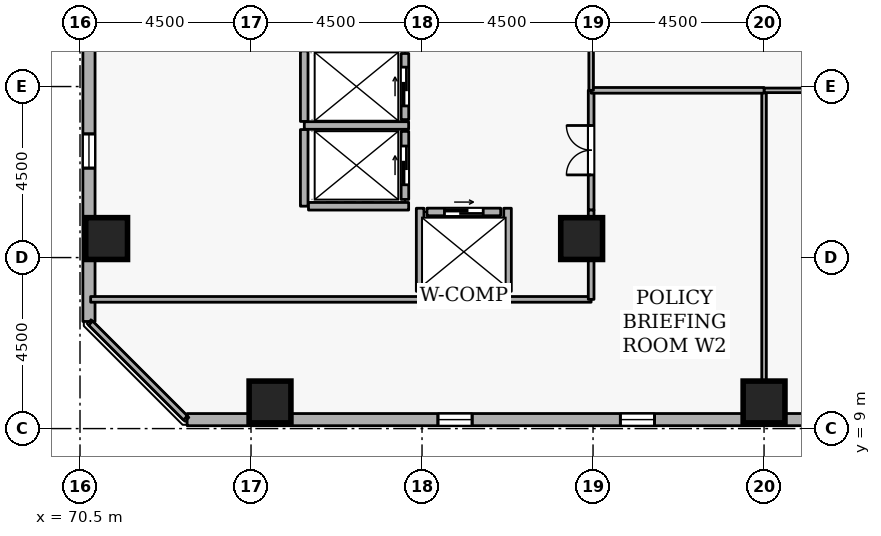
"""IFC4 building model, lengths in metres.
Left out: names, types, materials, properties, quantities, classifications, styles, units other than length and angle.
Written with IfcOpenShell. Run it as: python <this file> out.ifc"""

import sys

from ifc_helpers import new_model, si_unit, direction, frame, frame_2d, origin, origin_2d, place, context, subcontext, project, spatial, rectangle, extrude, element, fill, save


model = new_model("IFC4")
c1 = context("Model", 3, precision=1e-05, world=origin(), true_north=direction((0.0, 1.0)))
c2 = subcontext(c1, "Body", "Model", "MODEL_VIEW")
j1 = project(units=[si_unit("LENGTHUNIT", "METRE"), si_unit("PLANEANGLEUNIT", "RADIAN")], contexts=[c1])
p1 = place(None, origin())
s1 = spatial("IfcSite", under=j1, at=p1, CompositionType="ELEMENT")
p2 = place(p1, origin())
s2 = spatial("IfcBuilding", under=s1, at=p2, CompositionType="ELEMENT")
p3 = place(p2, frame((0.0, 0.0, 159.9)))
s3 = spatial("IfcBuildingStorey", under=s2, at=p3, CompositionType="ELEMENT", Elevation=159.9)
for number, where, z_axis, x_axis in (
    (1, (71.2, 14.0, 0.0), (0.0, 0.0, 1.0), (1.0, 0.0, 0.0)),
    (2, (88.5, 9.7, 0.0), (0.0, 0.0, 1.0), (1.0, 0.0, 0.0)),
    (3, (75.5, 9.7, 0.0), (0.0, 0.0, 1.0), (1.0, 0.0, 0.0)),
    (4, (83.7, 14.0, 0.0), (0.0, 0.0, 1.0), (1.0, 0.0, 0.0)),
):
    element("IfcColumn", number, at=place(p3, frame(where, z_axis=z_axis, x_axis=x_axis)), inside=s3, PredefinedType="COLUMN", context=c2, shape_type="SweptSolid", body=[
        extrude(rectangle(XDim=1.1, YDim=1.1, at=origin_2d()), origin(), (0.0, 0.0, 1.0), 3.6),
    ])
p4 = place(p3, frame((73.319, 9.235, 0.0), z_axis=(0.0, 0.0, 1.0), x_axis=(0.999999997144, 7.5574884e-05, 0.0)))
e5 = element("IfcWall", 5, at=p4, inside=s3, PredefinedType="STANDARD", context=c2, shape_type="SweptSolid", body=[
    extrude(rectangle(XDim=35.535, YDim=0.32, at=frame_2d((17.768, 0.0))), origin(), (0.0, 0.0, 1.0), 2.7),
])
p5 = place(p4, frame((6.6, 0.0, 0.72)))
e6 = element("IfcOpeningElement", 6, at=p5, cuts=e5, PredefinedType="OPENING", context=c2, shape_type="SweptSolid", body=[
    extrude(rectangle(XDim=0.9, YDim=1.75, at=frame_2d((0.45, 0.875))), frame((0.0, 0.17, 0.0), z_axis=(0.0, -1.0, 0.0), x_axis=(1.0, 0.0, 0.0)), (0.0, 0.0, 1.0), 0.34),
])
p6 = place(p4, frame((11.4, 0.0, 0.72)))
e7 = element("IfcOpeningElement", 7, at=p6, cuts=e5, PredefinedType="OPENING", context=c2, shape_type="SweptSolid", body=[
    extrude(rectangle(XDim=0.9, YDim=1.75, at=frame_2d((0.45, 0.875))), frame((0.0, 0.17, 0.0), z_axis=(0.0, -1.0, 0.0), x_axis=(1.0, 0.0, 0.0)), (0.0, 0.0, 1.0), 0.34),
])
p7 = place(p4, frame((21.0, 0.0, 0.72)))
e8 = element("IfcOpeningElement", 8, at=p7, cuts=e5, PredefinedType="OPENING", context=c2, shape_type="SweptSolid", body=[
    extrude(rectangle(XDim=0.9, YDim=1.75, at=frame_2d((0.45, 0.875))), frame((0.0, 0.17, 0.0), z_axis=(0.0, -1.0, 0.0), x_axis=(1.0, 0.0, 0.0)), (0.0, 0.0, 1.0), 0.34),
])
p8 = place(p4, frame((25.8, 0.0, 0.72)))
e9 = element("IfcOpeningElement", 9, at=p8, cuts=e5, PredefinedType="OPENING", context=c2, shape_type="SweptSolid", body=[
    extrude(rectangle(XDim=0.9, YDim=1.75, at=frame_2d((0.45, 0.875))), frame((0.0, 0.17, 0.0), z_axis=(0.0, -1.0, 0.0), x_axis=(1.0, 0.0, 0.0)), (0.0, 0.0, 1.0), 0.34),
])
p9 = place(p4, frame((30.6, 0.0, 0.72)))
e10 = element("IfcOpeningElement", 10, at=p9, cuts=e5, PredefinedType="OPENING", context=c2, shape_type="SweptSolid", body=[
    extrude(rectangle(XDim=0.9, YDim=1.75, at=frame_2d((0.45, 0.875))), frame((0.0, 0.17, 0.0), z_axis=(0.0, -1.0, 0.0), x_axis=(1.0, 0.0, 0.0)), (0.0, 0.0, 1.0), 0.34),
])
p10 = place(p3, frame((70.738, 47.354, 0.0), z_axis=(0.0, 0.0, 1.0), x_axis=(-7.5574884e-05, -0.999999997144, 0.0)))
e11 = element("IfcWall", 11, at=p10, inside=s3, PredefinedType="STANDARD", context=c2, shape_type="SweptSolid", body=[
    extrude(rectangle(XDim=35.535, YDim=0.32, at=frame_2d((17.768, 0.0))), origin(), (0.0, 0.0, 1.0), 2.7),
])
p11 = place(p10, frame((1.8, 0.0, 0.72)))
e12 = element("IfcOpeningElement", 12, at=p11, cuts=e11, PredefinedType="OPENING", context=c2, shape_type="SweptSolid", body=[
    extrude(rectangle(XDim=0.9, YDim=1.75, at=frame_2d((0.45, 0.875))), frame((0.0, 0.17, 0.0), z_axis=(0.0, -1.0, 0.0), x_axis=(1.0, 0.0, 0.0)), (0.0, 0.0, 1.0), 0.34),
])
p12 = place(p10, frame((11.4, 0.0, 0.72)))
e13 = element("IfcOpeningElement", 13, at=p12, cuts=e11, PredefinedType="OPENING", context=c2, shape_type="SweptSolid", body=[
    extrude(rectangle(XDim=0.9, YDim=1.75, at=frame_2d((0.45, 0.875))), frame((0.0, 0.17, 0.0), z_axis=(0.0, -1.0, 0.0), x_axis=(1.0, 0.0, 0.0)), (0.0, 0.0, 1.0), 0.34),
])
p13 = place(p10, frame((16.2, 0.0, 0.72)))
e14 = element("IfcOpeningElement", 14, at=p13, cuts=e11, PredefinedType="OPENING", context=c2, shape_type="SweptSolid", body=[
    extrude(rectangle(XDim=0.9, YDim=1.75, at=frame_2d((0.45, 0.875))), frame((0.0, 0.17, 0.0), z_axis=(0.0, -1.0, 0.0), x_axis=(1.0, 0.0, 0.0)), (0.0, 0.0, 1.0), 0.34),
])
p14 = place(p10, frame((25.8, 0.0, 0.72)))
e15 = element("IfcOpeningElement", 15, at=p14, cuts=e11, PredefinedType="OPENING", context=c2, shape_type="SweptSolid", body=[
    extrude(rectangle(XDim=0.9, YDim=1.75, at=frame_2d((0.45, 0.875))), frame((0.0, 0.17, 0.0), z_axis=(0.0, -1.0, 0.0), x_axis=(1.0, 0.0, 0.0)), (0.0, 0.0, 1.0), 0.34),
])
p15 = place(p10, frame((30.6, 0.0, 0.72)))
e16 = element("IfcOpeningElement", 16, at=p15, cuts=e11, PredefinedType="OPENING", context=c2, shape_type="SweptSolid", body=[
    extrude(rectangle(XDim=0.9, YDim=1.75, at=frame_2d((0.45, 0.875))), frame((0.0, 0.17, 0.0), z_axis=(0.0, -1.0, 0.0), x_axis=(1.0, 0.0, 0.0)), (0.0, 0.0, 1.0), 0.34),
])
p16 = place(p3, frame((79.05, 17.13, 0.0), z_axis=(0.0, 0.0, 1.0), x_axis=(0.0, 1.0, 0.0)))
e17 = element("IfcWall", 17, at=p16, inside=s3, PredefinedType="STANDARD", context=c2, shape_type="SweptSolid", body=[
    extrude(rectangle(XDim=1.74, YDim=0.2, at=frame_2d((0.87, 0.0))), origin(), (0.0, 0.0, 1.0), 3.34),
])
p17 = place(p16, frame((0.36, 0.0, 0.0)))
e18 = element("IfcOpeningElement", 18, at=p17, cuts=e17, PredefinedType="OPENING", context=c2, shape_type="SweptSolid", body=[
    extrude(rectangle(XDim=1.02, YDim=2.06, at=frame_2d((0.51, 1.03))), frame((0.0, 0.11, 0.0), z_axis=(0.0, -1.0, 0.0), x_axis=(1.0, 0.0, 0.0)), (0.0, 0.0, 1.0), 0.22),
])
p18 = place(p3, frame((79.05, 15.03, 0.0), z_axis=(0.0, 0.0, 1.0), x_axis=(0.0, 1.0, 0.0)))
e19 = element("IfcWall", 19, at=p18, inside=s3, PredefinedType="STANDARD", context=c2, shape_type="SweptSolid", body=[
    extrude(rectangle(XDim=1.79, YDim=0.2, at=frame_2d((0.895, 0.0))), origin(), (0.0, 0.0, 1.0), 3.34),
])
p19 = place(p18, frame((0.385, 0.0, 0.0)))
e20 = element("IfcOpeningElement", 20, at=p19, cuts=e19, PredefinedType="OPENING", context=c2, shape_type="SweptSolid", body=[
    extrude(rectangle(XDim=1.02, YDim=2.06, at=frame_2d((0.51, 1.03))), frame((0.0, 0.11, 0.0), z_axis=(0.0, -1.0, 0.0), x_axis=(1.0, 0.0, 0.0)), (0.0, 0.0, 1.0), 0.22),
])
p20 = place(p3, frame((79.63, 14.7, 0.0), z_axis=(0.0, 0.0, 1.0), x_axis=(1.0, 0.0, 0.0)))
e21 = element("IfcWall", 21, at=p20, inside=s3, PredefinedType="STANDARD", context=c2, shape_type="SweptSolid", body=[
    extrude(rectangle(XDim=1.94, YDim=0.2, at=frame_2d((0.97, 0.0))), origin(), (0.0, 0.0, 1.0), 3.34),
])
p21 = place(p20, frame((0.46, 0.0, 0.0)))
e22 = element("IfcOpeningElement", 22, at=p21, cuts=e21, PredefinedType="OPENING", context=c2, shape_type="SweptSolid", body=[
    extrude(rectangle(XDim=1.02, YDim=2.06, at=frame_2d((0.51, 1.03))), frame((0.0, 0.11, 0.0), z_axis=(0.0, -1.0, 0.0), x_axis=(1.0, 0.0, 0.0)), (0.0, 0.0, 1.0), 0.22),
])
p22 = place(p3, frame((76.402, 16.975, 0.0), z_axis=(0.0, 0.0, 1.0), x_axis=(1.0, 0.0, 0.0)))
e23 = element("IfcWall", 23, at=p22, inside=s3, PredefinedType="STANDARD", context=c2, shape_type="SweptSolid", body=[
    extrude(rectangle(XDim=2.746, YDim=0.2, at=frame_2d((1.373, 0.0))), origin(), (0.0, 0.0, 1.0), 3.34),
])
p23 = place(p3, frame((76.4, 14.852, 0.0), z_axis=(0.0, 0.0, 1.0), x_axis=(0.0, 1.0, 0.0)))
e24 = element("IfcWall", 24, at=p23, inside=s3, PredefinedType="STANDARD", context=c2, shape_type="SweptSolid", body=[
    extrude(rectangle(XDim=2.016, YDim=0.2, at=frame_2d((1.008, 0.0))), origin(), (0.0, 0.0, 1.0), 3.34),
])
p24 = place(p3, frame((76.4, 17.082, 0.0), z_axis=(0.0, 0.0, 1.0), x_axis=(0.0, 1.0, 0.0)))
e25 = element("IfcWall", 25, at=p24, inside=s3, PredefinedType="STANDARD", context=c2, shape_type="SweptSolid", body=[
    extrude(rectangle(XDim=1.856, YDim=0.2, at=frame_2d((0.928, 0.0))), origin(), (0.0, 0.0, 1.0), 3.34),
])
p25 = place(p3, frame((76.512, 14.85, 0.0), z_axis=(0.0, 0.0, 1.0), x_axis=(1.0, 0.0, 0.0)))
e26 = element("IfcWall", 26, at=p25, inside=s3, PredefinedType="STANDARD", context=c2, shape_type="SweptSolid", body=[
    extrude(rectangle(XDim=2.636, YDim=0.2, at=frame_2d((1.318, 0.0))), origin(), (0.0, 0.0, 1.0), 3.34),
])
p26 = place(p3, frame((79.452, 12.5, 0.0), z_axis=(0.0, 0.0, 1.0), x_axis=(1.0, 0.0, 0.0)))
e27 = element("IfcWall", 27, at=p26, inside=s3, PredefinedType="STANDARD", context=c2, shape_type="SweptSolid", body=[
    extrude(rectangle(XDim=2.296, YDim=0.2, at=frame_2d((1.148, 0.0))), origin(), (0.0, 0.0, 1.0), 3.34),
])
for number, where, z_axis, x_axis in (
    (28, (81.75, 12.612, 0.0), (0.0, 0.0, 1.0), (0.0, 1.0, 0.0)),
    (29, (79.45, 12.612, 0.0), (0.0, 0.0, 1.0), (0.0, 1.0, 0.0)),
):
    element("IfcWall", number, at=place(p3, frame(where, z_axis=z_axis, x_axis=x_axis)), inside=s3, PredefinedType="STANDARD", context=c2, shape_type="SweptSolid", body=[
        extrude(rectangle(XDim=2.186, YDim=0.2, at=frame_2d((1.093, 0.0))), origin(), (0.0, 0.0, 1.0), 3.34),
    ])
p27 = place(p3, frame((88.5, 9.28, 0.0), z_axis=(0.0, 0.0, 1.0), x_axis=(0.0, 1.0, 0.0)))
e30 = element("IfcWall", 30, at=p27, inside=s3, PredefinedType="PARTITIONING", context=c2, shape_type="SweptSolid", body=[
    extrude(rectangle(XDim=8.62, YDim=0.12, at=frame_2d((4.31, 0.0))), origin(), (0.0, 0.0, 1.0), 2.878),
])
p28 = place(p3, frame((88.5, 17.9, 0.0), z_axis=(0.0, 0.0, 1.0), x_axis=(1.0, 0.0, 0.0)))
e31 = element("IfcWall", 31, at=p28, inside=s3, PredefinedType="PARTITIONING", context=c2, shape_type="SweptSolid", body=[
    extrude(rectangle(XDim=4.55, YDim=0.12, at=frame_2d((2.275, 0.0))), origin(), (0.0, 0.0, 1.0), 3.34),
])
p29 = place(p3, frame((83.95, 14.75, 0.0), z_axis=(0.0, 0.0, 1.0), x_axis=(0.0, 1.0, 0.0)))
e32 = element("IfcWall", 32, at=p29, inside=s3, PredefinedType="PARTITIONING", context=c2, shape_type="SweptSolid", body=[
    extrude(rectangle(XDim=3.15, YDim=0.15, at=frame_2d((1.575, 0.0))), origin(), (0.0, 0.0, 1.0), 3.34),
])
p30 = place(p29, frame((0.925, 0.0, 0.0)))
e33 = element("IfcOpeningElement", 33, at=p30, cuts=e32, PredefinedType="OPENING", context=c2, shape_type="SweptSolid", body=[
    extrude(rectangle(XDim=1.3, YDim=2.12, at=frame_2d((0.65, 1.06))), frame((0.0, 0.085, 0.0), z_axis=(0.0, -1.0, 0.0), x_axis=(1.0, 0.0, 0.0)), (0.0, 0.0, 1.0), 0.17),
])
p31 = place(p3, frame((83.95, 17.9, 0.0), z_axis=(0.0, 0.0, 1.0), x_axis=(1.0, 0.0, 0.0)))
e34 = element("IfcWall", 34, at=p31, inside=s3, PredefinedType="PARTITIONING", context=c2, shape_type="SweptSolid", body=[
    extrude(rectangle(XDim=4.55, YDim=0.15, at=frame_2d((2.275, 0.0))), origin(), (0.0, 0.0, 1.0), 3.34),
])
p32 = place(p3, frame((73.275, 9.28, 0.0), z_axis=(0.0, 0.0, 1.0), x_axis=(-0.707106781187, 0.707106781187, 0.0)))
e35 = element("IfcWall", 35, at=p32, inside=s3, PredefinedType="PARTITIONING", context=c2, shape_type="SweptSolid", body=[
    extrude(rectangle(XDim=3.528, YDim=0.15, at=frame_2d((1.764, 0.0))), origin(), (0.0, 0.0, 1.0), 3.34),
])
p33 = place(p3, frame((70.78, 12.4, 0.0), z_axis=(0.0, 0.0, 1.0), x_axis=(1.0, 0.0, 0.0)))
e36 = element("IfcWall", 36, at=p33, inside=s3, PredefinedType="PARTITIONING", context=c2, shape_type="SweptSolid", body=[
    extrude(rectangle(XDim=8.672, YDim=0.15, at=frame_2d((4.336, 0.0))), origin(), (0.0, 0.0, 1.0), 3.34),
])
p34 = place(p3, frame((81.748, 12.4, 0.0), z_axis=(0.0, 0.0, 1.0), x_axis=(1.0, 0.0, 0.0)))
e37 = element("IfcWall", 37, at=p34, inside=s3, PredefinedType="PARTITIONING", context=c2, shape_type="SweptSolid", body=[
    extrude(rectangle(XDim=2.202, YDim=0.15, at=frame_2d((1.101, 0.0))), origin(), (0.0, 0.0, 1.0), 3.34),
])
p35 = place(p3, frame((83.95, 12.4, 0.0), z_axis=(0.0, 0.0, 1.0), x_axis=(0.0, 1.0, 0.0)))
e38 = element("IfcWall", 38, at=p35, inside=s3, PredefinedType="PARTITIONING", context=c2, shape_type="SweptSolid", body=[
    extrude(rectangle(XDim=2.35, YDim=0.15, at=frame_2d((1.175, 0.0))), origin(), (0.0, 0.0, 1.0), 3.34),
])
p36 = place(p3, frame((83.95, 17.9, 0.0), z_axis=(0.0, 0.0, 1.0), x_axis=(0.0, 1.0, 0.0)))
e39 = element("IfcWall", 39, at=p36, inside=s3, PredefinedType="PARTITIONING", context=c2, shape_type="SweptSolid", body=[
    extrude(rectangle(XDim=4.5, YDim=0.12, at=frame_2d((2.25, 0.0))), origin(), (0.0, 0.0, 1.0), 3.34),
])
p37 = place(p36, frame((1.775, 0.0, 0.0)))
e40 = element("IfcOpeningElement", 40, at=p37, cuts=e39, PredefinedType="OPENING", context=c2, shape_type="SweptSolid", body=[
    extrude(rectangle(XDim=0.95, YDim=2.1, at=frame_2d((0.475, 1.05))), frame((0.0, 0.07, 0.0), z_axis=(0.0, -1.0, 0.0), x_axis=(1.0, 0.0, 0.0)), (0.0, 0.0, 1.0), 0.14),
])
p38 = place(p5, origin())
e41 = element("IfcWindow", 41, at=p38, inside=s3, PartitioningType="SINGLE_PANEL", PredefinedType="WINDOW", context=c2, shape_type="SweptSolid", body=[
    extrude(rectangle(XDim=0.9, YDim=1.75, at=frame_2d((0.45, 0.875))), frame((0.0, 0.03, 0.0), z_axis=(0.0, -1.0, 0.0), x_axis=(1.0, 0.0, 0.0)), (0.0, 0.0, 1.0), 0.06),
])
fill(e6, e41)
p39 = place(p6, origin())
e42 = element("IfcWindow", 42, at=p39, inside=s3, PartitioningType="SINGLE_PANEL", PredefinedType="WINDOW", context=c2, shape_type="SweptSolid", body=[
    extrude(rectangle(XDim=0.9, YDim=1.75, at=frame_2d((0.45, 0.875))), frame((0.0, 0.03, 0.0), z_axis=(0.0, -1.0, 0.0), x_axis=(1.0, 0.0, 0.0)), (0.0, 0.0, 1.0), 0.06),
])
fill(e7, e42)
p40 = place(p15, origin())
e43 = element("IfcWindow", 43, at=p40, inside=s3, PartitioningType="SINGLE_PANEL", PredefinedType="WINDOW", context=c2, shape_type="SweptSolid", body=[
    extrude(rectangle(XDim=0.9, YDim=1.75, at=frame_2d((0.45, 0.875))), frame((0.0, 0.03, 0.0), z_axis=(0.0, -1.0, 0.0), x_axis=(1.0, 0.0, 0.0)), (0.0, 0.0, 1.0), 0.06),
])
fill(e16, e43)
p41 = place(p17, origin())
e44 = element("IfcDoor", 44, at=p41, inside=s3, OperationType="SLIDING_TO_LEFT", PredefinedType="DOOR", context=c2, shape_type="SweptSolid", body=[
    extrude(rectangle(XDim=1.02, YDim=2.06, at=frame_2d((0.51, 1.03))), frame((0.0, 0.025, 0.0), z_axis=(0.0, -1.0, 0.0), x_axis=(1.0, 0.0, 0.0)), (0.0, 0.0, 1.0), 0.05),
])
fill(e18, e44)
p42 = place(p19, origin())
e45 = element("IfcDoor", 45, at=p42, inside=s3, OperationType="SLIDING_TO_LEFT", PredefinedType="DOOR", context=c2, shape_type="SweptSolid", body=[
    extrude(rectangle(XDim=1.02, YDim=2.06, at=frame_2d((0.51, 1.03))), frame((0.0, 0.025, 0.0), z_axis=(0.0, -1.0, 0.0), x_axis=(1.0, 0.0, 0.0)), (0.0, 0.0, 1.0), 0.05),
])
fill(e20, e45)
p43 = place(p21, origin())
e46 = element("IfcDoor", 46, at=p43, inside=s3, OperationType="SLIDING_TO_LEFT", PredefinedType="DOOR", context=c2, shape_type="SweptSolid", body=[
    extrude(rectangle(XDim=1.02, YDim=2.06, at=frame_2d((0.51, 1.03))), frame((0.0, 0.025, 0.0), z_axis=(0.0, -1.0, 0.0), x_axis=(1.0, 0.0, 0.0)), (0.0, 0.0, 1.0), 0.05),
])
fill(e22, e46)
p44 = place(p30, origin())
e47 = element("IfcDoor", 47, at=p44, inside=s3, OperationType="DOUBLE_DOOR_SINGLE_SWING", PredefinedType="DOOR", context=c2, shape_type="SweptSolid", body=[
    extrude(rectangle(XDim=1.3, YDim=2.12, at=frame_2d((0.65, 1.06))), frame((0.0, 0.025, 0.0), z_axis=(0.0, -1.0, 0.0), x_axis=(1.0, 0.0, 0.0)), (0.0, 0.0, 1.0), 0.05),
])
fill(e33, e47)
save(model, sys.argv[1])
